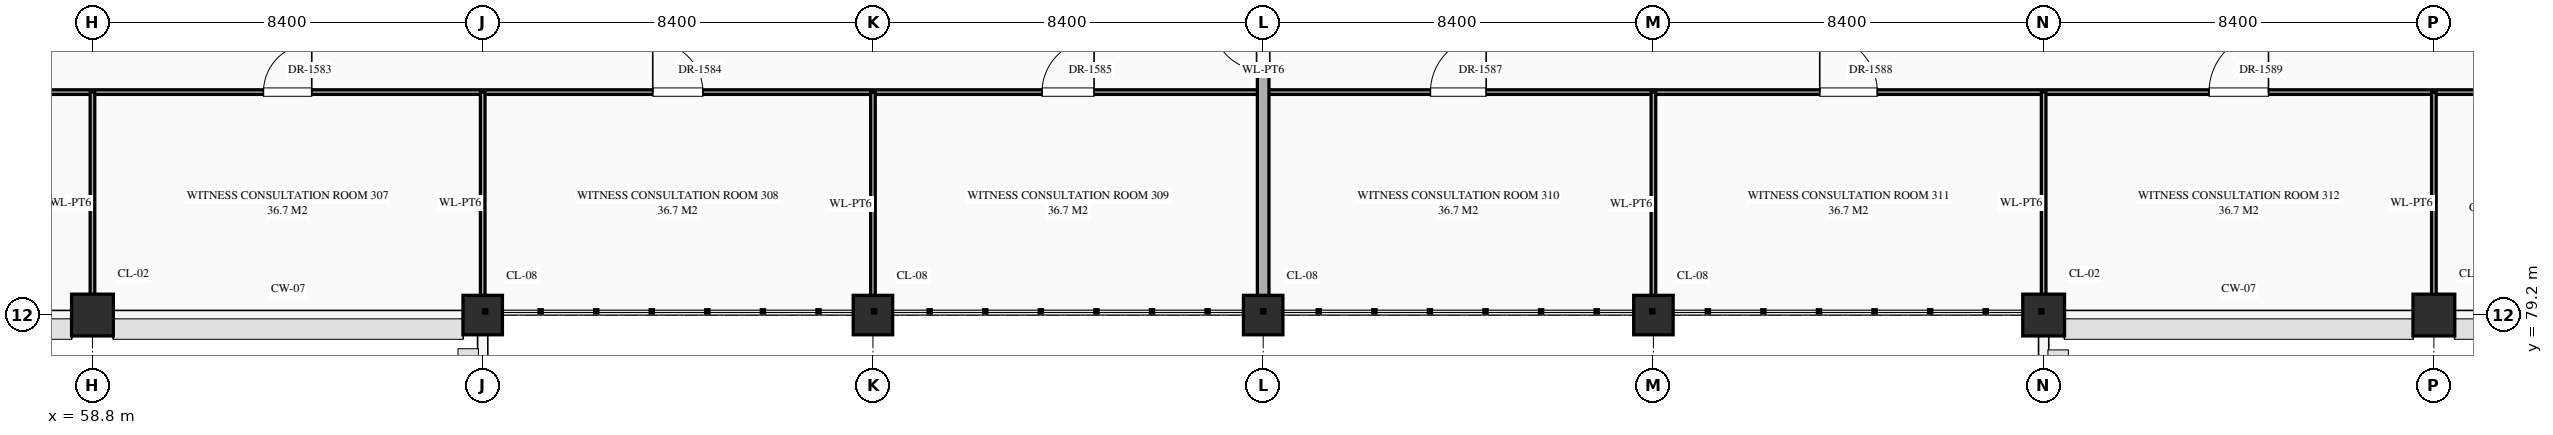
"""IFC4 building model, lengths in metres.
Left out: names, types, materials, properties, quantities, classifications, styles, units other than length and angle.
Written with IfcOpenShell. Run it as: python <this file> out.ifc"""

import sys

from ifc_helpers import new_model, si_unit, direction, frame, frame_2d, origin, origin_2d, place, context, subcontext, project, spatial, rectangle, circle, extrude, element, fill, save


model = new_model("IFC4")
c1 = context("Model", 3, precision=1e-05, world=origin(), true_north=direction((0.0, 1.0)))
c2 = subcontext(c1, "Body", "Model", "MODEL_VIEW")
j1 = project(units=[si_unit("LENGTHUNIT", "METRE"), si_unit("PLANEANGLEUNIT", "RADIAN")], contexts=[c1])
p1 = place(None, origin())
s1 = spatial("IfcSite", under=j1, at=p1, CompositionType="ELEMENT")
p2 = place(p1, origin())
s2 = spatial("IfcBuilding", under=s1, at=p2, CompositionType="ELEMENT")
p3 = place(p2, frame((0.0, 0.0, 10.8)))
s3 = spatial("IfcBuildingStorey", under=s2, at=p3, CompositionType="ELEMENT", Elevation=10.8)
p4 = place(p3, frame((58.8, 79.2, 0.0), z_axis=(0.0, 0.0, 1.0), x_axis=(1.0, 0.0, 0.0)))
e1 = element("IfcColumn", 1, at=p4, inside=s3, PredefinedType="COLUMN", context=c2, shape_type="SweptSolid", body=[
    extrude(rectangle(XDim=0.9, YDim=0.9, at=origin_2d()), origin(), (0.0, 0.0, 1.0), 5.4),
])
for number, where, z_axis, x_axis in (
    (2, (67.2, 79.2, 0.0), (0.0, 0.0, 1.0), (1.0, 0.0, 0.0)),
    (3, (75.6, 79.2, 0.0), (0.0, 0.0, 1.0), (1.0, 0.0, 0.0)),
    (4, (84.0, 79.2, 0.0), (0.0, 0.0, 1.0), (1.0, 0.0, 0.0)),
    (5, (92.4, 79.2, 0.0), (0.0, 0.0, 1.0), (1.0, 0.0, 0.0)),
):
    element("IfcColumn", number, at=place(p3, frame(where, z_axis=z_axis, x_axis=x_axis)), inside=s3, PredefinedType="COLUMN", context=c2, shape_type="SweptSolid", body=[
        extrude(circle(Radius=0.425, at=origin_2d()), origin(), (0.0, 0.0, 1.0), 5.4),
    ])
for number, where, z_axis, x_axis in (
    (6, (100.8, 79.2, 0.0), (0.0, 0.0, 1.0), (1.0, 0.0, 0.0)),
    (7, (109.2, 79.2, 0.0), (0.0, 0.0, 1.0), (1.0, 0.0, 0.0)),
):
    element("IfcColumn", number, at=place(p3, frame(where, z_axis=z_axis, x_axis=x_axis)), inside=s3, PredefinedType="COLUMN", context=c2, shape_type="SweptSolid", body=[
        extrude(rectangle(XDim=0.9, YDim=0.9, at=origin_2d()), origin(), (0.0, 0.0, 1.0), 5.4),
    ])
p5 = place(p3, frame((50.4, 84.0, 0.0), z_axis=(0.0, 0.0, 1.0), x_axis=(1.0, 0.0, 0.0)))
e8 = element("IfcWall", 8, at=p5, inside=s3, PredefinedType="STANDARD", context=c2, shape_type="SweptSolid", body=[
    extrude(rectangle(XDim=67.2, YDim=0.1, at=frame_2d((33.6, 0.0))), origin(), (0.0, 0.0, 1.0), 5.12),
])
p6 = place(p5, frame((3.7, 0.0, 0.0)))
e9 = element("IfcOpeningElement", 9, at=p6, cuts=e8, PredefinedType="OPENING", context=c2, shape_type="SweptSolid", body=[
    extrude(rectangle(XDim=1.0, YDim=2.25, at=frame_2d((0.5, 1.125))), frame((0.0, 0.062, 0.0), z_axis=(0.0, -1.0, 0.0), x_axis=(1.0, 0.0, 0.0)), (0.0, 0.0, 1.0), 0.124),
])
p7 = place(p5, frame((12.08, 0.0, 0.0)))
e10 = element("IfcOpeningElement", 10, at=p7, cuts=e8, PredefinedType="OPENING", context=c2, shape_type="SweptSolid", body=[
    extrude(rectangle(XDim=1.04, YDim=2.2, at=frame_2d((0.52, 1.1))), frame((0.0, 0.062, 0.0), z_axis=(0.0, -1.0, 0.0), x_axis=(1.0, 0.0, 0.0)), (0.0, 0.0, 1.0), 0.124),
])
p8 = place(p5, frame((20.46, 0.0, 0.0)))
e11 = element("IfcOpeningElement", 11, at=p8, cuts=e8, PredefinedType="OPENING", context=c2, shape_type="SweptSolid", body=[
    extrude(rectangle(XDim=1.08, YDim=2.25, at=frame_2d((0.54, 1.125))), frame((0.0, 0.062, 0.0), z_axis=(0.0, -1.0, 0.0), x_axis=(1.0, 0.0, 0.0)), (0.0, 0.0, 1.0), 0.124),
])
p9 = place(p5, frame((28.84, 0.0, 0.0)))
e12 = element("IfcOpeningElement", 12, at=p9, cuts=e8, PredefinedType="OPENING", context=c2, shape_type="SweptSolid", body=[
    extrude(rectangle(XDim=1.12, YDim=2.25, at=frame_2d((0.56, 1.125))), frame((0.0, 0.062, 0.0), z_axis=(0.0, -1.0, 0.0), x_axis=(1.0, 0.0, 0.0)), (0.0, 0.0, 1.0), 0.124),
])
p10 = place(p5, frame((37.2, 0.0, 0.0)))
e13 = element("IfcOpeningElement", 13, at=p10, cuts=e8, PredefinedType="OPENING", context=c2, shape_type="SweptSolid", body=[
    extrude(rectangle(XDim=1.2, YDim=2.35, at=frame_2d((0.6, 1.175))), frame((0.0, 0.062, 0.0), z_axis=(0.0, -1.0, 0.0), x_axis=(1.0, 0.0, 0.0)), (0.0, 0.0, 1.0), 0.124),
])
p11 = place(p5, frame((45.58, 0.0, 0.0)))
e14 = element("IfcOpeningElement", 14, at=p11, cuts=e8, PredefinedType="OPENING", context=c2, shape_type="SweptSolid", body=[
    extrude(rectangle(XDim=1.24, YDim=2.3, at=frame_2d((0.62, 1.15))), frame((0.0, 0.062, 0.0), z_axis=(0.0, -1.0, 0.0), x_axis=(1.0, 0.0, 0.0)), (0.0, 0.0, 1.0), 0.124),
])
p12 = place(p5, frame((53.96, 0.0, 0.0)))
e15 = element("IfcOpeningElement", 15, at=p12, cuts=e8, PredefinedType="OPENING", context=c2, shape_type="SweptSolid", body=[
    extrude(rectangle(XDim=1.28, YDim=2.35, at=frame_2d((0.64, 1.175))), frame((0.0, 0.062, 0.0), z_axis=(0.0, -1.0, 0.0), x_axis=(1.0, 0.0, 0.0)), (0.0, 0.0, 1.0), 0.124),
])
p13 = place(p5, frame((62.53, 0.0, 0.0)))
e16 = element("IfcOpeningElement", 16, at=p13, cuts=e8, PredefinedType="OPENING", context=c2, shape_type="SweptSolid", body=[
    extrude(rectangle(XDim=0.94, YDim=2.3, at=frame_2d((0.47, 1.15))), frame((0.0, 0.062, 0.0), z_axis=(0.0, -1.0, 0.0), x_axis=(1.0, 0.0, 0.0)), (0.0, 0.0, 1.0), 0.124),
])
for number, where, z_axis, x_axis in (
    (17, (58.8, 79.24, 0.0), (0.0, 0.0, 1.0), (0.0, 1.0, 0.0)),
    (18, (67.2, 79.24, 0.0), (0.0, 0.0, 1.0), (0.0, 1.0, 0.0)),
):
    element("IfcWall", number, at=place(p3, frame(where, z_axis=z_axis, x_axis=x_axis)), inside=s3, PredefinedType="STANDARD", context=c2, shape_type="SweptSolid", body=[
        extrude(rectangle(XDim=4.76, YDim=0.1, at=frame_2d((2.38, 0.0))), origin(), (0.0, 0.0, 1.0), 4.37),
    ])
p14 = place(p3, frame((75.6, 79.2, 0.0), z_axis=(0.0, 0.0, 1.0), x_axis=(0.0, 1.0, 0.0)))
e19 = element("IfcWall", 19, at=p14, inside=s3, PredefinedType="STANDARD", context=c2, shape_type="SweptSolid", body=[
    extrude(rectangle(XDim=4.8, YDim=0.1, at=frame_2d((2.4, 0.0))), origin(), (0.0, 0.0, 1.0), 4.37),
])
p15 = place(p3, frame((84.0, 79.2, 0.0), z_axis=(0.0, 0.0, 1.0), x_axis=(0.0, 1.0, 0.0)))
e20 = element("IfcWall", 20, at=p15, inside=s3, PredefinedType="STANDARD", context=c2, shape_type="SweptSolid", body=[
    extrude(rectangle(XDim=35.96, YDim=0.25, at=frame_2d((17.98, 0.0))), origin(), (0.0, 0.0, 1.0), 4.37),
])
p16 = place(p15, frame((22.835, 0.0, 0.0)))
e21 = element("IfcOpeningElement", 21, at=p16, cuts=e20, PredefinedType="OPENING", context=c2, shape_type="SweptSolid", body=[
    extrude(rectangle(XDim=1.5, YDim=2.25, at=frame_2d((0.75, 1.125))), frame((0.0, 0.137, 0.0), z_axis=(0.0, -1.0, 0.0), x_axis=(1.0, 0.0, 0.0)), (0.0, 0.0, 1.0), 0.274),
])
p17 = place(p15, frame((12.465, 0.0, 0.0)))
e22 = element("IfcOpeningElement", 22, at=p17, cuts=e20, PredefinedType="OPENING", context=c2, shape_type="SweptSolid", body=[
    extrude(rectangle(XDim=1.1, YDim=2.2, at=frame_2d((0.55, 1.1))), frame((0.0, 0.137, 0.0), z_axis=(0.0, -1.0, 0.0), x_axis=(1.0, 0.0, 0.0)), (0.0, 0.0, 1.0), 0.274),
])
p18 = place(p15, frame((15.31, 0.0, 0.0)))
e23 = element("IfcOpeningElement", 23, at=p18, cuts=e20, PredefinedType="OPENING", context=c2, shape_type="SweptSolid", body=[
    extrude(rectangle(XDim=0.95, YDim=2.15, at=frame_2d((0.475, 1.075))), frame((0.0, 0.137, 0.0), z_axis=(0.0, -1.0, 0.0), x_axis=(1.0, 0.0, 0.0)), (0.0, 0.0, 1.0), 0.274),
])
p19 = place(p15, frame((25.915, 0.0, 0.0)))
e24 = element("IfcOpeningElement", 24, at=p19, cuts=e20, PredefinedType="OPENING", context=c2, shape_type="SweptSolid", body=[
    extrude(rectangle(XDim=1.8, YDim=2.35, at=frame_2d((0.9, 1.175))), frame((0.0, 0.137, 0.0), z_axis=(0.0, -1.0, 0.0), x_axis=(1.0, 0.0, 0.0)), (0.0, 0.0, 1.0), 0.274),
])
p20 = place(p15, frame((29.71, 0.0, 0.0)))
e25 = element("IfcOpeningElement", 25, at=p20, cuts=e20, PredefinedType="OPENING", context=c2, shape_type="SweptSolid", body=[
    extrude(rectangle(XDim=0.95, YDim=2.15, at=frame_2d((0.475, 1.075))), frame((0.0, 0.137, 0.0), z_axis=(0.0, -1.0, 0.0), x_axis=(1.0, 0.0, 0.0)), (0.0, 0.0, 1.0), 0.274),
])
p21 = place(p15, frame((5.265, 0.0, 0.0)))
e26 = element("IfcOpeningElement", 26, at=p21, cuts=e20, PredefinedType="OPENING", context=c2, shape_type="SweptSolid", body=[
    extrude(rectangle(XDim=1.1, YDim=2.2, at=frame_2d((0.55, 1.1))), frame((0.0, 0.137, 0.0), z_axis=(0.0, -1.0, 0.0), x_axis=(1.0, 0.0, 0.0)), (0.0, 0.0, 1.0), 0.274),
])
p22 = place(p3, frame((92.4, 79.2, 0.0), z_axis=(0.0, 0.0, 1.0), x_axis=(0.0, 1.0, 0.0)))
e27 = element("IfcWall", 27, at=p22, inside=s3, PredefinedType="STANDARD", context=c2, shape_type="SweptSolid", body=[
    extrude(rectangle(XDim=4.8, YDim=0.1, at=frame_2d((2.4, 0.0))), origin(), (0.0, 0.0, 1.0), 4.37),
])
for number, where, z_axis, x_axis in (
    (28, (100.8, 79.24, 0.0), (0.0, 0.0, 1.0), (0.0, 1.0, 0.0)),
    (29, (109.2, 79.24, 0.0), (0.0, 0.0, 1.0), (0.0, 1.0, 0.0)),
):
    element("IfcWall", number, at=place(p3, frame(where, z_axis=z_axis, x_axis=x_axis)), inside=s3, PredefinedType="STANDARD", context=c2, shape_type="SweptSolid", body=[
        extrude(rectangle(XDim=4.76, YDim=0.1, at=frame_2d((2.38, 0.0))), origin(), (0.0, 0.0, 1.0), 4.37),
    ])
p23 = place(p21, origin())
e30 = element("IfcDoor", 30, at=p23, inside=s3, OperationType="SINGLE_SWING_RIGHT", PredefinedType="DOOR", context=c2, shape_type="SweptSolid", body=[
    extrude(rectangle(XDim=1.1, YDim=2.2, at=frame_2d((0.55, 1.1))), frame((0.0, 0.025, 0.0), z_axis=(0.0, -1.0, 0.0), x_axis=(1.0, 0.0, 0.0)), (0.0, 0.0, 1.0), 0.05),
])
fill(e26, e30)
p24 = place(p7, origin())
e31 = element("IfcDoor", 31, at=p24, inside=s3, OperationType="SINGLE_SWING_RIGHT", PredefinedType="DOOR", context=c2, shape_type="SweptSolid", body=[
    extrude(rectangle(XDim=1.04, YDim=2.2, at=frame_2d((0.52, 1.1))), frame((0.0, 0.025, 0.0), z_axis=(0.0, -1.0, 0.0), x_axis=(1.0, 0.0, 0.0)), (0.0, 0.0, 1.0), 0.05),
])
fill(e10, e31)
p25 = place(p8, origin())
e32 = element("IfcDoor", 32, at=p25, inside=s3, OperationType="SINGLE_SWING_LEFT", PredefinedType="DOOR", context=c2, shape_type="SweptSolid", body=[
    extrude(rectangle(XDim=1.08, YDim=2.25, at=frame_2d((0.54, 1.125))), frame((0.0, 0.025, 0.0), z_axis=(0.0, -1.0, 0.0), x_axis=(1.0, 0.0, 0.0)), (0.0, 0.0, 1.0), 0.05),
])
fill(e11, e32)
p26 = place(p9, origin())
e33 = element("IfcDoor", 33, at=p26, inside=s3, OperationType="SINGLE_SWING_RIGHT", PredefinedType="DOOR", context=c2, shape_type="SweptSolid", body=[
    extrude(rectangle(XDim=1.12, YDim=2.25, at=frame_2d((0.56, 1.125))), frame((0.0, 0.025, 0.0), z_axis=(0.0, -1.0, 0.0), x_axis=(1.0, 0.0, 0.0)), (0.0, 0.0, 1.0), 0.05),
])
fill(e12, e33)
p27 = place(p10, origin())
e34 = element("IfcDoor", 34, at=p27, inside=s3, OperationType="SINGLE_SWING_RIGHT", PredefinedType="DOOR", context=c2, shape_type="SweptSolid", body=[
    extrude(rectangle(XDim=1.2, YDim=2.35, at=frame_2d((0.6, 1.175))), frame((0.0, 0.025, 0.0), z_axis=(0.0, -1.0, 0.0), x_axis=(1.0, 0.0, 0.0)), (0.0, 0.0, 1.0), 0.05),
])
fill(e13, e34)
p28 = place(p11, origin())
e35 = element("IfcDoor", 35, at=p28, inside=s3, OperationType="SINGLE_SWING_LEFT", PredefinedType="DOOR", context=c2, shape_type="SweptSolid", body=[
    extrude(rectangle(XDim=1.24, YDim=2.3, at=frame_2d((0.62, 1.15))), frame((0.0, 0.025, 0.0), z_axis=(0.0, -1.0, 0.0), x_axis=(1.0, 0.0, 0.0)), (0.0, 0.0, 1.0), 0.05),
])
fill(e14, e35)
p29 = place(p12, origin())
e36 = element("IfcDoor", 36, at=p29, inside=s3, OperationType="SINGLE_SWING_RIGHT", PredefinedType="DOOR", context=c2, shape_type="SweptSolid", body=[
    extrude(rectangle(XDim=1.28, YDim=2.35, at=frame_2d((0.64, 1.175))), frame((0.0, 0.025, 0.0), z_axis=(0.0, -1.0, 0.0), x_axis=(1.0, 0.0, 0.0)), (0.0, 0.0, 1.0), 0.05),
])
fill(e15, e36)
save(model, sys.argv[1])
